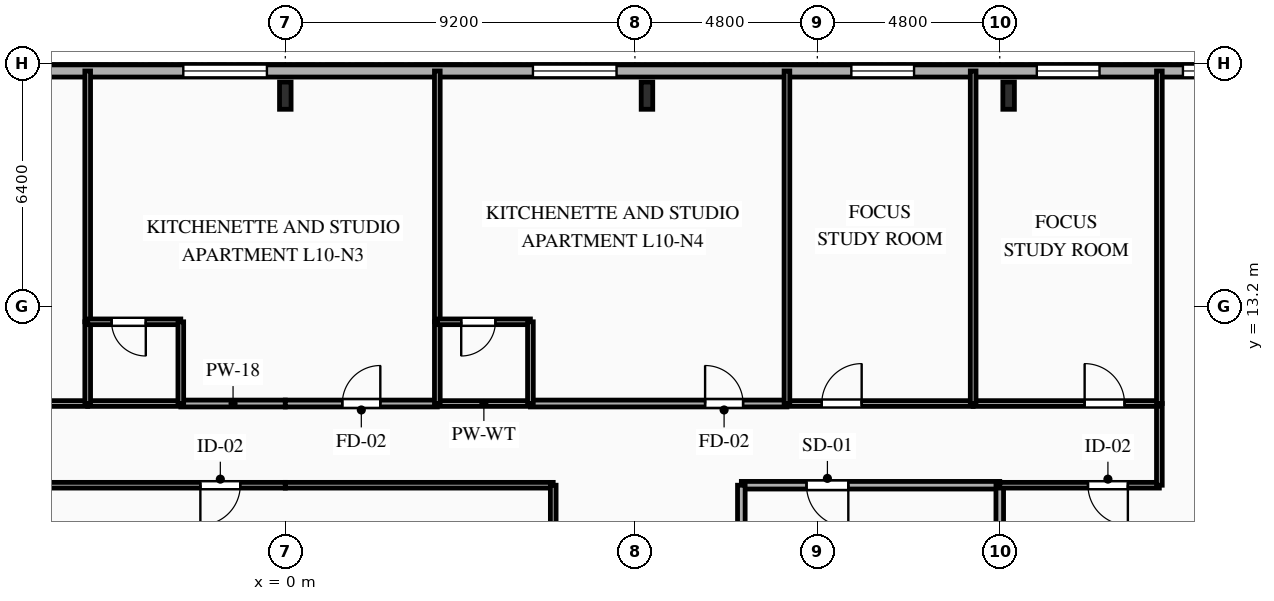
"""IFC4 building model, lengths in metres.
Left out: names, types, materials, properties, quantities, classifications, styles, units other than length and angle.
Written with IfcOpenShell. Run it as: python <this file> out.ifc"""

import sys

from ifc_helpers import new_model, si_unit, direction, frame, frame_2d, origin, origin_2d, place, context, subcontext, project, spatial, rectangle, i_section, extrude, element, fill, save


model = new_model("IFC4")
c1 = context("Model", 3, precision=1e-05, world=origin(), true_north=direction((0.0, 1.0)))
c2 = subcontext(c1, "Body", "Model", "MODEL_VIEW")
j1 = project(units=[si_unit("LENGTHUNIT", "METRE"), si_unit("PLANEANGLEUNIT", "RADIAN")], contexts=[c1])
p1 = place(None, origin())
s1 = spatial("IfcSite", under=j1, at=p1, CompositionType="ELEMENT")
p2 = place(p1, origin())
s2 = spatial("IfcBuilding", under=s1, at=p2, CompositionType="ELEMENT")
p3 = place(p2, frame((0.0, 0.0, 40.4)))
s3 = spatial("IfcBuildingStorey", under=s2, at=p3, CompositionType="ELEMENT", Elevation=40.4)
for number, where, z_axis, x_axis in (
    (1, (19.033, 18.75, 0.0), (0.0, 0.0, 1.0), (1.0, 0.0, 0.0)),
    (2, (9.517, 18.75, 0.0), (0.0, 0.0, 1.0), (1.0, 0.0, 0.0)),
    (3, (0.0, 18.75, 0.0), (0.0, 0.0, 1.0), (1.0, 0.0, 0.0)),
):
    element("IfcColumn", number, at=place(p3, frame(where, z_axis=z_axis, x_axis=x_axis)), inside=s3, PredefinedType="COLUMN", context=c2, shape_type="SweptSolid", body=[
        extrude(i_section(OverallWidth=0.304, OverallDepth=0.716, WebThickness=0.021, FlangeThickness=0.04, FilletRadius=0.027, at=origin_2d()), origin(), (0.0, 0.0, 1.0), 3.35),
    ])
p4 = place(p3, frame((-29.2, 19.4, 0.0), z_axis=(0.0, 0.0, 1.0), x_axis=(1.0, 0.0, 0.0)))
e4 = element("IfcWall", 4, at=p4, inside=s3, PredefinedType="SOLIDWALL", context=c2, shape_type="SweptSolid", body=[
    extrude(rectangle(XDim=58.4, YDim=0.32, at=frame_2d((29.2, 0.0))), origin(), (0.0, 0.0, 1.0), 3.035),
])
p5 = place(p4, frame((10.596, 0.0, 0.85)))
e5 = element("IfcOpeningElement", 5, at=p5, cuts=e4, PredefinedType="OPENING", context=c2, shape_type="SweptSolid", body=[
    extrude(rectangle(XDim=1.65, YDim=1.85, at=frame_2d((0.825, 0.925))), frame((0.0, 0.17, 0.0), z_axis=(0.0, -1.0, 0.0), x_axis=(1.0, 0.0, 0.0)), (0.0, 0.0, 1.0), 0.34),
])
p6 = place(p4, frame((19.85, 0.0, 0.85)))
e6 = element("IfcOpeningElement", 6, at=p6, cuts=e4, PredefinedType="OPENING", context=c2, shape_type="SweptSolid", body=[
    extrude(rectangle(XDim=1.5, YDim=1.85, at=frame_2d((0.75, 0.925))), frame((0.0, 0.17, 0.0), z_axis=(0.0, -1.0, 0.0), x_axis=(1.0, 0.0, 0.0)), (0.0, 0.0, 1.0), 0.34),
])
p7 = place(p4, frame((26.516, 0.0, 0.85)))
e7 = element("IfcOpeningElement", 7, at=p7, cuts=e4, PredefinedType="OPENING", context=c2, shape_type="SweptSolid", body=[
    extrude(rectangle(XDim=2.2, YDim=1.85, at=frame_2d((1.1, 0.925))), frame((0.0, 0.17, 0.0), z_axis=(0.0, -1.0, 0.0), x_axis=(1.0, 0.0, 0.0)), (0.0, 0.0, 1.0), 0.34),
])
p8 = place(p4, frame((35.716, 0.0, 0.85)))
e8 = element("IfcOpeningElement", 8, at=p8, cuts=e4, PredefinedType="OPENING", context=c2, shape_type="SweptSolid", body=[
    extrude(rectangle(XDim=2.2, YDim=1.85, at=frame_2d((1.1, 0.925))), frame((0.0, 0.17, 0.0), z_axis=(0.0, -1.0, 0.0), x_axis=(1.0, 0.0, 0.0)), (0.0, 0.0, 1.0), 0.34),
])
p9 = place(p4, frame((44.095, 0.0, 0.85)))
e9 = element("IfcOpeningElement", 9, at=p9, cuts=e4, PredefinedType="OPENING", context=c2, shape_type="SweptSolid", body=[
    extrude(rectangle(XDim=1.65, YDim=1.85, at=frame_2d((0.825, 0.925))), frame((0.0, 0.17, 0.0), z_axis=(0.0, -1.0, 0.0), x_axis=(1.0, 0.0, 0.0)), (0.0, 0.0, 1.0), 0.34),
])
p10 = place(p4, frame((48.975, 0.0, 0.85)))
e10 = element("IfcOpeningElement", 10, at=p10, cuts=e4, PredefinedType="OPENING", context=c2, shape_type="SweptSolid", body=[
    extrude(rectangle(XDim=1.65, YDim=1.85, at=frame_2d((0.825, 0.925))), frame((0.0, 0.17, 0.0), z_axis=(0.0, -1.0, 0.0), x_axis=(1.0, 0.0, 0.0)), (0.0, 0.0, 1.0), 0.34),
])
p11 = place(p4, frame((52.82, 0.0, 0.85)))
e11 = element("IfcOpeningElement", 11, at=p11, cuts=e4, PredefinedType="OPENING", context=c2, shape_type="SweptSolid", body=[
    extrude(rectangle(XDim=1.4, YDim=1.85, at=frame_2d((0.7, 0.925))), frame((0.0, 0.17, 0.0), z_axis=(0.0, -1.0, 0.0), x_axis=(1.0, 0.0, 0.0)), (0.0, 0.0, 1.0), 0.34),
])
p12 = place(p4, frame((55.575, 0.0, 0.85)))
e12 = element("IfcOpeningElement", 12, at=p12, cuts=e4, PredefinedType="OPENING", context=c2, shape_type="SweptSolid", body=[
    extrude(rectangle(XDim=1.65, YDim=1.85, at=frame_2d((0.825, 0.925))), frame((0.0, 0.17, 0.0), z_axis=(0.0, -1.0, 0.0), x_axis=(1.0, 0.0, 0.0)), (0.0, 0.0, 1.0), 0.34),
])
p13 = place(p3, frame((18.8, 8.5, 0.0), z_axis=(0.0, 0.0, 1.0), x_axis=(-1.0, 0.0, 0.0)))
e13 = element("IfcWall", 13, at=p13, inside=s3, PredefinedType="PARTITIONING", context=c2, shape_type="SweptSolid", body=[
    extrude(rectangle(XDim=6.8, YDim=0.2, at=frame_2d((3.4, 0.0))), origin(), (0.0, 0.0, 1.0), 3.035),
])
p14 = place(p13, frame((3.985, 0.0, 0.0)))
e14 = element("IfcOpeningElement", 14, at=p14, cuts=e13, PredefinedType="OPENING", context=c2, shape_type="SweptSolid", body=[
    extrude(rectangle(XDim=1.1, YDim=2.15, at=frame_2d((0.55, 1.075))), frame((0.0, 0.11, 0.0), z_axis=(0.0, -1.0, 0.0), x_axis=(1.0, 0.0, 0.0)), (0.0, 0.0, 1.0), 0.22),
])
p15 = place(p3, frame((12.0, 8.5, 0.0), z_axis=(0.0, 0.0, 1.0), x_axis=(0.0, -1.0, 0.0)))
e15 = element("IfcWall", 15, at=p15, inside=s3, PredefinedType="PARTITIONING", context=c2, shape_type="SweptSolid", body=[
    extrude(rectangle(XDim=2.9, YDim=0.2, at=frame_2d((1.45, 0.0))), origin(), (0.0, 0.0, 1.0), 3.035),
])
p16 = place(p3, frame((18.8, 6.327, 0.0), z_axis=(0.0, 0.0, 1.0), x_axis=(0.0, 1.0, 0.0)))
e16 = element("IfcWall", 16, at=p16, inside=s3, PredefinedType="PARTITIONING", context=c2, shape_type="SweptSolid", body=[
    extrude(rectangle(XDim=2.173, YDim=0.2, at=frame_2d((1.086, 0.0))), origin(), (0.0, 0.0, 1.0), 2.52),
])
p17 = place(p3, frame((-12.05, 10.65, 0.0), z_axis=(0.0, 0.0, 1.0), x_axis=(1.0, 0.0, 0.0)))
e17 = element("IfcWall", 17, at=p17, inside=s3, PredefinedType="PARTITIONING", context=c2, shape_type="SweptSolid", body=[
    extrude(rectangle(XDim=6.85, YDim=0.15, at=frame_2d((3.425, 0.0))), origin(), (0.0, 0.0, 1.0), 3.035),
])
p18 = place(p17, frame((4.728, 0.0, 0.0)))
e18 = element("IfcOpeningElement", 18, at=p18, cuts=e17, PredefinedType="OPENING", context=c2, shape_type="SweptSolid", body=[
    extrude(rectangle(XDim=0.95, YDim=2.1, at=frame_2d((0.475, 1.05))), frame((0.0, 0.085, 0.0), z_axis=(0.0, -1.0, 0.0), x_axis=(1.0, 0.0, 0.0)), (0.0, 0.0, 1.0), 0.17),
])
p19 = place(p3, frame((-2.75, 10.65, 0.0), z_axis=(0.0, 0.0, 1.0), x_axis=(1.0, 0.0, 0.0)))
e19 = element("IfcWall", 19, at=p19, inside=s3, PredefinedType="PARTITIONING", context=c2, shape_type="SweptSolid", body=[
    extrude(rectangle(XDim=2.75, YDim=0.18, at=frame_2d((1.375, 0.0))), origin(), (0.0, 0.0, 1.0), 3.035),
])
p20 = place(p3, frame((-5.2, 10.65, 0.0), z_axis=(0.0, 0.0, 1.0), x_axis=(1.0, 0.0, 0.0)))
e20 = element("IfcWall", 20, at=p20, inside=s3, PredefinedType="PLUMBINGWALL", context=c2, shape_type="SweptSolid", body=[
    extrude(rectangle(XDim=2.45, YDim=0.15, at=frame_2d((1.225, 0.0))), origin(), (0.0, 0.0, 1.0), 3.035),
])
p21 = place(p3, frame((0.0, 8.5, 0.0), z_axis=(0.0, 0.0, 1.0), x_axis=(-1.0, 0.0, 0.0)))
e21 = element("IfcWall", 21, at=p21, inside=s3, PredefinedType="PARTITIONING", context=c2, shape_type="SweptSolid", body=[
    extrude(rectangle(XDim=7.05, YDim=0.15, at=frame_2d((3.525, 0.0))), origin(), (0.0, 0.0, 1.0), 3.035),
])
p22 = place(p21, frame((1.185, 0.0, 0.0)))
e22 = element("IfcOpeningElement", 22, at=p22, cuts=e21, PredefinedType="OPENING", context=c2, shape_type="SweptSolid", body=[
    extrude(rectangle(XDim=1.05, YDim=2.15, at=frame_2d((0.525, 1.075))), frame((0.0, 0.085, 0.0), z_axis=(0.0, -1.0, 0.0), x_axis=(1.0, 0.0, 0.0)), (0.0, 0.0, 1.0), 0.17),
])
p23 = place(p3, frame((23.0, 8.5, 0.0), z_axis=(0.0, 0.0, 1.0), x_axis=(-1.0, 0.0, 0.0)))
e23 = element("IfcWall", 23, at=p23, inside=s3, PredefinedType="PARTITIONING", context=c2, shape_type="SweptSolid", body=[
    extrude(rectangle(XDim=4.2, YDim=0.15, at=frame_2d((2.1, 0.0))), origin(), (0.0, 0.0, 1.0), 3.035),
])
p24 = place(p23, frame((0.829, 0.0, 0.0)))
e24 = element("IfcOpeningElement", 24, at=p24, cuts=e23, PredefinedType="OPENING", context=c2, shape_type="SweptSolid", body=[
    extrude(rectangle(XDim=1.05, YDim=2.15, at=frame_2d((0.525, 1.075))), frame((0.0, 0.085, 0.0), z_axis=(0.0, -1.0, 0.0), x_axis=(1.0, 0.0, 0.0)), (0.0, 0.0, 1.0), 0.17),
])
p25 = place(p3, frame((23.0, 10.65, 0.0), z_axis=(0.0, 0.0, 1.0), x_axis=(0.0, -1.0, 0.0)))
e25 = element("IfcWall", 25, at=p25, inside=s3, PredefinedType="PARTITIONING", context=c2, shape_type="SweptSolid", body=[
    extrude(rectangle(XDim=2.15, YDim=0.15, at=frame_2d((1.075, 0.0))), origin(), (0.0, 0.0, 1.0), 3.035),
])
p26 = place(p3, frame((0.0, 10.65, 0.0), z_axis=(0.0, 0.0, 1.0), x_axis=(1.0, 0.0, 0.0)))
e26 = element("IfcWall", 26, at=p26, inside=s3, PredefinedType="PARTITIONING", context=c2, shape_type="SweptSolid", body=[
    extrude(rectangle(XDim=4.0, YDim=0.18, at=frame_2d((2.0, 0.0))), origin(), (0.0, 0.0, 1.0), 3.035),
])
p27 = place(p26, frame((1.5, 0.0, 0.0)))
e27 = element("IfcOpeningElement", 27, at=p27, cuts=e26, PredefinedType="OPENING", context=c2, shape_type="SweptSolid", body=[
    extrude(rectangle(XDim=1.0, YDim=2.15, at=frame_2d((0.5, 1.075))), frame((0.0, 0.1, 0.0), z_axis=(0.0, -1.0, 0.0), x_axis=(1.0, 0.0, 0.0)), (0.0, 0.0, 1.0), 0.2),
])
p28 = place(p3, frame((6.45, 10.65, 0.0), z_axis=(0.0, 0.0, 1.0), x_axis=(1.0, 0.0, 0.0)))
e28 = element("IfcWall", 28, at=p28, inside=s3, PredefinedType="PARTITIONING", context=c2, shape_type="SweptSolid", body=[
    extrude(rectangle(XDim=6.75, YDim=0.18, at=frame_2d((3.375, 0.0))), origin(), (0.0, 0.0, 1.0), 3.035),
])
p29 = place(p28, frame((4.596, 0.0, 0.0)))
e29 = element("IfcOpeningElement", 29, at=p29, cuts=e28, PredefinedType="OPENING", context=c2, shape_type="SweptSolid", body=[
    extrude(rectangle(XDim=1.0, YDim=2.15, at=frame_2d((0.5, 1.075))), frame((0.0, 0.1, 0.0), z_axis=(0.0, -1.0, 0.0), x_axis=(1.0, 0.0, 0.0)), (0.0, 0.0, 1.0), 0.2),
])
p30 = place(p3, frame((4.0, 10.65, 0.0), z_axis=(0.0, 0.0, 1.0), x_axis=(1.0, 0.0, 0.0)))
e30 = element("IfcWall", 30, at=p30, inside=s3, PredefinedType="PLUMBINGWALL", context=c2, shape_type="SweptSolid", body=[
    extrude(rectangle(XDim=2.45, YDim=0.15, at=frame_2d((1.225, 0.0))), origin(), (0.0, 0.0, 1.0), 3.035),
])
p31 = place(p3, frame((13.2, 10.65, 0.0), z_axis=(0.0, 0.0, 1.0), x_axis=(1.0, 0.0, 0.0)))
e31 = element("IfcWall", 31, at=p31, inside=s3, PredefinedType="PARTITIONING", context=c2, shape_type="SweptSolid", body=[
    extrude(rectangle(XDim=4.9, YDim=0.15, at=frame_2d((2.45, 0.0))), origin(), (0.0, 0.0, 1.0), 3.035),
])
p32 = place(p31, frame((0.916, 0.0, 0.0)))
e32 = element("IfcOpeningElement", 32, at=p32, cuts=e31, PredefinedType="OPENING", context=c2, shape_type="SweptSolid", body=[
    extrude(rectangle(XDim=1.05, YDim=2.15, at=frame_2d((0.525, 1.075))), frame((0.0, 0.085, 0.0), z_axis=(0.0, -1.0, 0.0), x_axis=(1.0, 0.0, 0.0)), (0.0, 0.0, 1.0), 0.17),
])
p33 = place(p3, frame((18.1, 10.65, 0.0), z_axis=(0.0, 0.0, 1.0), x_axis=(1.0, 0.0, 0.0)))
e33 = element("IfcWall", 33, at=p33, inside=s3, PredefinedType="PARTITIONING", context=c2, shape_type="SweptSolid", body=[
    extrude(rectangle(XDim=4.9, YDim=0.15, at=frame_2d((2.45, 0.0))), origin(), (0.0, 0.0, 1.0), 3.035),
])
p34 = place(p33, frame((2.934, 0.0, 0.0)))
e34 = element("IfcOpeningElement", 34, at=p34, cuts=e33, PredefinedType="OPENING", context=c2, shape_type="SweptSolid", body=[
    extrude(rectangle(XDim=1.05, YDim=2.15, at=frame_2d((0.525, 1.075))), frame((0.0, 0.085, 0.0), z_axis=(0.0, -1.0, 0.0), x_axis=(1.0, 0.0, 0.0)), (0.0, 0.0, 1.0), 0.17),
])
for number, where, z_axis, x_axis in (
    (35, (7.05, 8.5, 0.0), (0.0, 0.0, 1.0), (-1.0, 0.0, 0.0)),
    (36, (7.05, 1.45, 0.0), (0.0, 0.0, 1.0), (0.0, 1.0, 0.0)),
):
    element("IfcWall", number, at=place(p3, frame(where, z_axis=z_axis, x_axis=x_axis)), inside=s3, PredefinedType="PARTITIONING", context=c2, shape_type="SweptSolid", body=[
        extrude(rectangle(XDim=7.05, YDim=0.15, at=frame_2d((3.525, 0.0))), origin(), (0.0, 0.0, 1.0), 3.035),
    ])
p35 = place(p3, frame((23.0, 10.65, 0.0), z_axis=(0.0, 0.0, 1.0), x_axis=(0.0, 1.0, 0.0)))
e37 = element("IfcWall", 37, at=p35, inside=s3, PredefinedType="PARTITIONING", context=c2, shape_type="SweptSolid", body=[
    extrude(rectangle(XDim=8.75, YDim=0.15, at=frame_2d((4.375, 0.0))), origin(), (0.0, 0.0, 1.0), 3.035),
])
p36 = place(p3, frame((-5.2, 19.4, 0.0), z_axis=(0.0, 0.0, 1.0), x_axis=(0.0, -1.0, 0.0)))
e38 = element("IfcWall", 38, at=p36, inside=s3, PredefinedType="PARTITIONING", context=c2, shape_type="SweptSolid", body=[
    extrude(rectangle(XDim=6.6, YDim=0.15, at=frame_2d((3.3, 0.0))), origin(), (0.0, 0.0, 1.0), 3.035),
])
p37 = place(p3, frame((-5.2, 12.8, 0.0), z_axis=(0.0, 0.0, 1.0), x_axis=(0.0, -1.0, 0.0)))
e39 = element("IfcWall", 39, at=p37, inside=s3, PredefinedType="PLUMBINGWALL", context=c2, shape_type="SweptSolid", body=[
    extrude(rectangle(XDim=2.15, YDim=0.15, at=frame_2d((1.075, 0.0))), origin(), (0.0, 0.0, 1.0), 3.035),
])
p38 = place(p3, frame((-2.75, 12.8, 0.0), z_axis=(0.0, 0.0, 1.0), x_axis=(-1.0, 0.0, 0.0)))
e40 = element("IfcWall", 40, at=p38, inside=s3, PredefinedType="PLUMBINGWALL", context=c2, shape_type="SweptSolid", body=[
    extrude(rectangle(XDim=2.45, YDim=0.15, at=frame_2d((1.225, 0.0))), origin(), (0.0, 0.0, 1.0), 3.035),
])
p39 = place(p38, frame((0.921, 0.0, 0.0)))
e41 = element("IfcOpeningElement", 41, at=p39, cuts=e40, PredefinedType="OPENING", context=c2, shape_type="SweptSolid", body=[
    extrude(rectangle(XDim=0.9, YDim=2.1, at=frame_2d((0.45, 1.05))), frame((0.0, 0.085, 0.0), z_axis=(0.0, -1.0, 0.0), x_axis=(1.0, 0.0, 0.0)), (0.0, 0.0, 1.0), 0.17),
])
p40 = place(p3, frame((-2.75, 10.65, 0.0), z_axis=(0.0, 0.0, 1.0), x_axis=(0.0, 1.0, 0.0)))
e42 = element("IfcWall", 42, at=p40, inside=s3, PredefinedType="PLUMBINGWALL", context=c2, shape_type="SweptSolid", body=[
    extrude(rectangle(XDim=2.15, YDim=0.15, at=frame_2d((1.075, 0.0))), origin(), (0.0, 0.0, 1.0), 3.035),
])
p41 = place(p3, frame((4.0, 19.4, 0.0), z_axis=(0.0, 0.0, 1.0), x_axis=(0.0, -1.0, 0.0)))
e43 = element("IfcWall", 43, at=p41, inside=s3, PredefinedType="PARTITIONING", context=c2, shape_type="SweptSolid", body=[
    extrude(rectangle(XDim=6.6, YDim=0.15, at=frame_2d((3.3, 0.0))), origin(), (0.0, 0.0, 1.0), 3.035),
])
p42 = place(p3, frame((4.0, 12.8, 0.0), z_axis=(0.0, 0.0, 1.0), x_axis=(0.0, -1.0, 0.0)))
e44 = element("IfcWall", 44, at=p42, inside=s3, PredefinedType="PLUMBINGWALL", context=c2, shape_type="SweptSolid", body=[
    extrude(rectangle(XDim=2.15, YDim=0.15, at=frame_2d((1.075, 0.0))), origin(), (0.0, 0.0, 1.0), 3.035),
])
p43 = place(p3, frame((6.45, 12.8, 0.0), z_axis=(0.0, 0.0, 1.0), x_axis=(-1.0, 0.0, 0.0)))
e45 = element("IfcWall", 45, at=p43, inside=s3, PredefinedType="PLUMBINGWALL", context=c2, shape_type="SweptSolid", body=[
    extrude(rectangle(XDim=2.45, YDim=0.15, at=frame_2d((1.225, 0.0))), origin(), (0.0, 0.0, 1.0), 3.035),
])
p44 = place(p43, frame((0.921, 0.0, 0.0)))
e46 = element("IfcOpeningElement", 46, at=p44, cuts=e45, PredefinedType="OPENING", context=c2, shape_type="SweptSolid", body=[
    extrude(rectangle(XDim=0.9, YDim=2.1, at=frame_2d((0.45, 1.05))), frame((0.0, 0.085, 0.0), z_axis=(0.0, -1.0, 0.0), x_axis=(1.0, 0.0, 0.0)), (0.0, 0.0, 1.0), 0.17),
])
p45 = place(p3, frame((6.45, 10.65, 0.0), z_axis=(0.0, 0.0, 1.0), x_axis=(0.0, 1.0, 0.0)))
e47 = element("IfcWall", 47, at=p45, inside=s3, PredefinedType="PLUMBINGWALL", context=c2, shape_type="SweptSolid", body=[
    extrude(rectangle(XDim=2.15, YDim=0.15, at=frame_2d((1.075, 0.0))), origin(), (0.0, 0.0, 1.0), 3.035),
])
for number, where, z_axis, x_axis in (
    (48, (13.2, 19.4, 0.0), (0.0, 0.0, 1.0), (0.0, -1.0, 0.0)),
    (49, (18.1, 19.4, 0.0), (0.0, 0.0, 1.0), (0.0, -1.0, 0.0)),
):
    element("IfcWall", number, at=place(p3, frame(where, z_axis=z_axis, x_axis=x_axis)), inside=s3, PredefinedType="PARTITIONING", context=c2, shape_type="SweptSolid", body=[
        extrude(rectangle(XDim=8.75, YDim=0.15, at=frame_2d((4.375, 0.0))), origin(), (0.0, 0.0, 1.0), 3.035),
    ])
p46 = place(p7, origin())
e50 = element("IfcWindow", 50, at=p46, inside=s3, PartitioningType="SINGLE_PANEL", PredefinedType="WINDOW", context=c2, shape_type="SweptSolid", body=[
    extrude(rectangle(XDim=2.2, YDim=1.85, at=frame_2d((1.1, 0.925))), frame((0.0, 0.03, 0.0), z_axis=(0.0, -1.0, 0.0), x_axis=(1.0, 0.0, 0.0)), (0.0, 0.0, 1.0), 0.06),
])
fill(e7, e50)
p47 = place(p8, origin())
e51 = element("IfcWindow", 51, at=p47, inside=s3, PartitioningType="SINGLE_PANEL", PredefinedType="WINDOW", context=c2, shape_type="SweptSolid", body=[
    extrude(rectangle(XDim=2.2, YDim=1.85, at=frame_2d((1.1, 0.925))), frame((0.0, 0.03, 0.0), z_axis=(0.0, -1.0, 0.0), x_axis=(1.0, 0.0, 0.0)), (0.0, 0.0, 1.0), 0.06),
])
fill(e8, e51)
p48 = place(p9, origin())
e52 = element("IfcWindow", 52, at=p48, inside=s3, PartitioningType="SINGLE_PANEL", PredefinedType="WINDOW", context=c2, shape_type="SweptSolid", body=[
    extrude(rectangle(XDim=1.65, YDim=1.85, at=frame_2d((0.825, 0.925))), frame((0.0, 0.03, 0.0), z_axis=(0.0, -1.0, 0.0), x_axis=(1.0, 0.0, 0.0)), (0.0, 0.0, 1.0), 0.06),
])
fill(e9, e52)
p49 = place(p10, origin())
e53 = element("IfcWindow", 53, at=p49, inside=s3, PartitioningType="SINGLE_PANEL", PredefinedType="WINDOW", context=c2, shape_type="SweptSolid", body=[
    extrude(rectangle(XDim=1.65, YDim=1.85, at=frame_2d((0.825, 0.925))), frame((0.0, 0.03, 0.0), z_axis=(0.0, -1.0, 0.0), x_axis=(1.0, 0.0, 0.0)), (0.0, 0.0, 1.0), 0.06),
])
fill(e10, e53)
p50 = place(p11, origin())
e54 = element("IfcWindow", 54, at=p50, inside=s3, PartitioningType="SINGLE_PANEL", PredefinedType="WINDOW", context=c2, shape_type="SweptSolid", body=[
    extrude(rectangle(XDim=1.4, YDim=1.85, at=frame_2d((0.7, 0.925))), frame((0.0, 0.03, 0.0), z_axis=(0.0, -1.0, 0.0), x_axis=(1.0, 0.0, 0.0)), (0.0, 0.0, 1.0), 0.06),
])
fill(e11, e54)
p51 = place(p14, origin())
e55 = element("IfcDoor", 55, at=p51, inside=s3, OperationType="SINGLE_SWING_LEFT", PredefinedType="DOOR", context=c2, shape_type="SweptSolid", body=[
    extrude(rectangle(XDim=1.1, YDim=2.15, at=frame_2d((0.55, 1.075))), frame((0.0, 0.025, 0.0), z_axis=(0.0, -1.0, 0.0), x_axis=(1.0, 0.0, 0.0)), (0.0, 0.0, 1.0), 0.05),
])
fill(e14, e55)
p52 = place(p22, origin())
e56 = element("IfcDoor", 56, at=p52, inside=s3, OperationType="SINGLE_SWING_RIGHT", PredefinedType="DOOR", context=c2, shape_type="SweptSolid", body=[
    extrude(rectangle(XDim=1.05, YDim=2.15, at=frame_2d((0.525, 1.075))), frame((0.0, 0.025, 0.0), z_axis=(0.0, -1.0, 0.0), x_axis=(1.0, 0.0, 0.0)), (0.0, 0.0, 1.0), 0.05),
])
fill(e22, e56)
p53 = place(p24, origin())
e57 = element("IfcDoor", 57, at=p53, inside=s3, OperationType="SINGLE_SWING_LEFT", PredefinedType="DOOR", context=c2, shape_type="SweptSolid", body=[
    extrude(rectangle(XDim=1.05, YDim=2.15, at=frame_2d((0.525, 1.075))), frame((0.0, 0.025, 0.0), z_axis=(0.0, -1.0, 0.0), x_axis=(1.0, 0.0, 0.0)), (0.0, 0.0, 1.0), 0.05),
])
fill(e24, e57)
p54 = place(p27, origin())
e58 = element("IfcDoor", 58, at=p54, inside=s3, OperationType="SINGLE_SWING_RIGHT", PredefinedType="DOOR", context=c2, shape_type="SweptSolid", body=[
    extrude(rectangle(XDim=1.0, YDim=2.15, at=frame_2d((0.5, 1.075))), frame((0.0, 0.025, 0.0), z_axis=(0.0, -1.0, 0.0), x_axis=(1.0, 0.0, 0.0)), (0.0, 0.0, 1.0), 0.05),
])
fill(e27, e58)
p55 = place(p29, origin())
e59 = element("IfcDoor", 59, at=p55, inside=s3, OperationType="SINGLE_SWING_LEFT", PredefinedType="DOOR", context=c2, shape_type="SweptSolid", body=[
    extrude(rectangle(XDim=1.0, YDim=2.15, at=frame_2d((0.5, 1.075))), frame((0.0, 0.025, 0.0), z_axis=(0.0, -1.0, 0.0), x_axis=(1.0, 0.0, 0.0)), (0.0, 0.0, 1.0), 0.05),
])
fill(e29, e59)
p56 = place(p32, origin())
e60 = element("IfcDoor", 60, at=p56, inside=s3, OperationType="SINGLE_SWING_RIGHT", PredefinedType="DOOR", context=c2, shape_type="SweptSolid", body=[
    extrude(rectangle(XDim=1.05, YDim=2.15, at=frame_2d((0.525, 1.075))), frame((0.0, 0.025, 0.0), z_axis=(0.0, -1.0, 0.0), x_axis=(1.0, 0.0, 0.0)), (0.0, 0.0, 1.0), 0.05),
])
fill(e32, e60)
p57 = place(p34, origin())
e61 = element("IfcDoor", 61, at=p57, inside=s3, OperationType="SINGLE_SWING_LEFT", PredefinedType="DOOR", context=c2, shape_type="SweptSolid", body=[
    extrude(rectangle(XDim=1.05, YDim=2.15, at=frame_2d((0.525, 1.075))), frame((0.0, 0.025, 0.0), z_axis=(0.0, -1.0, 0.0), x_axis=(1.0, 0.0, 0.0)), (0.0, 0.0, 1.0), 0.05),
])
fill(e34, e61)
p58 = place(p39, origin())
e62 = element("IfcDoor", 62, at=p58, inside=s3, OperationType="SINGLE_SWING_LEFT", PredefinedType="DOOR", context=c2, shape_type="SweptSolid", body=[
    extrude(rectangle(XDim=0.9, YDim=2.1, at=frame_2d((0.45, 1.05))), frame((0.0, 0.025, 0.0), z_axis=(0.0, -1.0, 0.0), x_axis=(1.0, 0.0, 0.0)), (0.0, 0.0, 1.0), 0.05),
])
fill(e41, e62)
p59 = place(p44, origin())
e63 = element("IfcDoor", 63, at=p59, inside=s3, OperationType="SINGLE_SWING_RIGHT", PredefinedType="DOOR", context=c2, shape_type="SweptSolid", body=[
    extrude(rectangle(XDim=0.9, YDim=2.1, at=frame_2d((0.45, 1.05))), frame((0.0, 0.025, 0.0), z_axis=(0.0, -1.0, 0.0), x_axis=(1.0, 0.0, 0.0)), (0.0, 0.0, 1.0), 0.05),
])
fill(e46, e63)
save(model, sys.argv[1])
